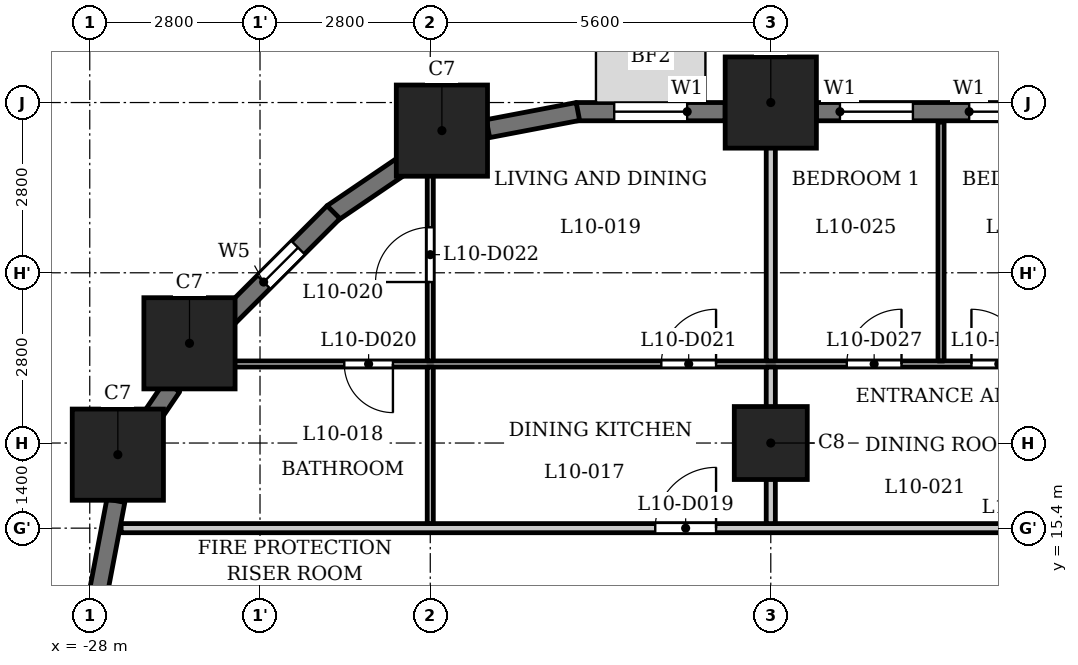
"""IFC4 building model, lengths in metres.
Left out: names, types, materials, properties, quantities, classifications, styles, units other than length and angle.
Written with IfcOpenShell. Run it as: python <this file> out.ifc"""

import sys

from ifc_helpers import new_model, si_unit, direction, frame, frame_2d, origin, origin_2d, place, context, subcontext, project, spatial, rectangle, extrude, element, fill, save


model = new_model("IFC4")
c1 = context("Model", 3, precision=1e-05, world=origin(), true_north=direction((0.0, 1.0)))
c2 = subcontext(c1, "Body", "Model", "MODEL_VIEW")
j1 = project(units=[si_unit("LENGTHUNIT", "METRE"), si_unit("PLANEANGLEUNIT", "RADIAN")], contexts=[c1])
p1 = place(None, origin())
s1 = spatial("IfcSite", under=j1, at=p1, CompositionType="ELEMENT")
p2 = place(p1, origin())
s2 = spatial("IfcBuilding", under=s1, at=p2, CompositionType="ELEMENT")
p3 = place(p2, frame((0.0, 0.0, 44.5)))
s3 = spatial("IfcBuildingStorey", under=s2, at=p3, CompositionType="ELEMENT", Elevation=44.5)
for number, where, z_axis, x_axis in (
    (1, (-16.8, 22.4, 0.0), (0.0, 0.0, 1.0), (1.0, 0.0, 0.0)),
    (2, (-22.209, 21.938, 0.0), (0.0, 0.0, 1.0), (1.0, 0.0, 0.0)),
    (3, (-26.36, 18.44, 0.0), (0.0, 0.0, 1.0), (1.0, 0.0, 0.0)),
    (4, (-27.538, 16.609, 0.0), (0.0, 0.0, 1.0), (1.0, 0.0, 0.0)),
):
    element("IfcColumn", number, at=place(p3, frame(where, z_axis=z_axis, x_axis=x_axis)), inside=s3, PredefinedType="COLUMN", context=c2, shape_type="SweptSolid", body=[
        extrude(rectangle(XDim=1.5, YDim=1.5, at=origin_2d()), origin(), (0.0, 0.0, 1.0), 3.5),
    ])
p4 = place(p3, frame((-16.8, 16.8, 0.0), z_axis=(0.0, 0.0, 1.0), x_axis=(1.0, 0.0, 0.0)))
e5 = element("IfcColumn", 5, at=p4, inside=s3, PredefinedType="COLUMN", context=c2, shape_type="SweptSolid", body=[
    extrude(rectangle(XDim=1.2, YDim=1.2, at=origin_2d()), origin(), (0.0, 0.0, 1.0), 3.5),
])
p5 = place(p3, frame((-11.95, 22.25, 0.0), z_axis=(0.0, 0.0, 1.0), x_axis=(-1.0, 0.0, 0.0)))
e6 = element("IfcWall", 6, at=p5, inside=s3, PredefinedType="SOLIDWALL", context=c2, shape_type="SweptSolid", body=[
    extrude(rectangle(XDim=4.1, YDim=0.3, at=frame_2d((2.05, 0.0))), origin(), (0.0, 0.0, 1.0), 2.35),
])
p6 = place(p5, frame((0.387, 0.0, 0.6)))
e7 = element("IfcOpeningElement", 7, at=p6, cuts=e6, PredefinedType="OPENING", context=c2, shape_type="SweptSolid", body=[
    extrude(rectangle(XDim=1.2, YDim=1.55, at=frame_2d((0.6, 0.775))), frame((0.0, 0.16, 0.0), z_axis=(0.0, -1.0, 0.0), x_axis=(1.0, 0.0, 0.0)), (0.0, 0.0, 1.0), 0.32),
])
p7 = place(p5, frame((2.512, 0.0, 0.6)))
e8 = element("IfcOpeningElement", 8, at=p7, cuts=e6, PredefinedType="OPENING", context=c2, shape_type="SweptSolid", body=[
    extrude(rectangle(XDim=1.2, YDim=1.55, at=frame_2d((0.6, 0.775))), frame((0.0, 0.16, 0.0), z_axis=(0.0, -1.0, 0.0), x_axis=(1.0, 0.0, 0.0)), (0.0, 0.0, 1.0), 0.32),
])
p8 = place(p3, frame((-17.55, 22.25, 0.0), z_axis=(0.0, 0.0, 1.0), x_axis=(-1.0, 0.0, 0.0)))
e9 = element("IfcWall", 9, at=p8, inside=s3, PredefinedType="SOLIDWALL", context=c2, shape_type="SweptSolid", body=[
    extrude(rectangle(XDim=2.45, YDim=0.3, at=frame_2d((1.225, 0.0))), origin(), (0.0, 0.0, 1.0), 2.35),
])
p9 = place(p8, frame((0.625, 0.0, 0.6)))
e10 = element("IfcOpeningElement", 10, at=p9, cuts=e9, PredefinedType="OPENING", context=c2, shape_type="SweptSolid", body=[
    extrude(rectangle(XDim=1.2, YDim=1.55, at=frame_2d((0.6, 0.775))), frame((0.0, 0.16, 0.0), z_axis=(0.0, -1.0, 0.0), x_axis=(1.0, 0.0, 0.0)), (0.0, 0.0, 1.0), 0.32),
])
for number, where, z_axis, x_axis in (
    (11, (-19.972, 22.253, 0.0), (0.0, 0.0, 1.0), (-0.982, -0.187, 0.0)),
    (12, (-22.767, 21.426, 0.0), (0.0, 0.0, 1.0), (-0.827, -0.562, 0.0)),
):
    element("IfcWall", number, at=place(p3, frame(where, z_axis=z_axis, x_axis=x_axis)), inside=s3, PredefinedType="SOLIDWALL", context=c2, shape_type="SweptSolid", body=[
        extrude(rectangle(XDim=1.506, YDim=0.3, at=frame_2d((0.753, 0.0))), origin(), (0.0, 0.0, 1.0), 2.35),
    ])
p10 = place(p3, frame((-23.991, 20.597, 0.0), z_axis=(0.0, 0.0, 1.0), x_axis=(-0.707106781187, -0.707106781187, 0.0)))
e13 = element("IfcWall", 13, at=p10, inside=s3, PredefinedType="SOLIDWALL", context=c2, shape_type="SweptSolid", body=[
    extrude(rectangle(XDim=2.45, YDim=0.3, at=frame_2d((1.225, 0.0))), origin(), (0.0, 0.0, 1.0), 2.35),
])
p11 = place(p10, frame((0.825, 0.0, 0.6)))
e14 = element("IfcOpeningElement", 14, at=p11, cuts=e13, PredefinedType="OPENING", context=c2, shape_type="SweptSolid", body=[
    extrude(rectangle(XDim=0.8, YDim=1.55, at=frame_2d((0.4, 0.775))), frame((0.0, 0.16, 0.0), z_axis=(0.0, -1.0, 0.0), x_axis=(1.0, 0.0, 0.0)), (0.0, 0.0, 1.0), 0.32),
])
p12 = place(p3, frame((-26.645, 17.727, 0.0), z_axis=(0.0, 0.0, 1.0), x_axis=(-0.562083182981, -0.827080706709, 0.0)))
e15 = element("IfcWall", 15, at=p12, inside=s3, PredefinedType="SOLIDWALL", context=c2, shape_type="SweptSolid", body=[
    extrude(rectangle(XDim=0.677, YDim=0.3, at=frame_2d((0.339, 0.0))), origin(), (0.0, 0.0, 1.0), 3.2),
])
p13 = place(p3, frame((-27.571, 15.851, 0.0), z_axis=(0.0, 0.0, 1.0), x_axis=(-0.187223837635, -0.982317277982, 0.0)))
e16 = element("IfcWall", 16, at=p13, inside=s3, PredefinedType="SOLIDWALL", context=c2, shape_type="SweptSolid", body=[
    extrude(rectangle(XDim=1.506, YDim=0.3, at=frame_2d((0.753, 0.0))), origin(), (0.0, 0.0, 1.0), 2.35),
])
p14 = place(p3, frame((-27.484, 15.4, 0.0), z_axis=(0.0, 0.0, 1.0), x_axis=(1.0, 0.0, 0.0)))
e17 = element("IfcWall", 17, at=p14, inside=s3, PredefinedType="PARTITIONING", context=c2, shape_type="SweptSolid", body=[
    extrude(rectangle(XDim=54.968, YDim=0.15, at=frame_2d((27.484, 0.0))), origin(), (0.0, 0.0, 1.0), 3.2),
])
p15 = place(p14, frame((8.784, 0.0, 0.0)))
e18 = element("IfcOpeningElement", 18, at=p15, cuts=e17, PredefinedType="OPENING", context=c2, shape_type="SweptSolid", body=[
    extrude(rectangle(XDim=1.0, YDim=2.1, at=frame_2d((0.5, 1.05))), frame((0.0, 0.085, 0.0), z_axis=(0.0, -1.0, 0.0), x_axis=(1.0, 0.0, 0.0)), (0.0, 0.0, 1.0), 0.17),
])
p16 = place(p14, frame((14.634, 0.0, 0.0)))
e19 = element("IfcOpeningElement", 19, at=p16, cuts=e17, PredefinedType="OPENING", context=c2, shape_type="SweptSolid", body=[
    extrude(rectangle(XDim=1.0, YDim=2.1, at=frame_2d((0.5, 1.05))), frame((0.0, 0.085, 0.0), z_axis=(0.0, -1.0, 0.0), x_axis=(1.0, 0.0, 0.0)), (0.0, 0.0, 1.0), 0.17),
])
p17 = place(p14, frame((25.834, 0.0, 0.0)))
e20 = element("IfcOpeningElement", 20, at=p17, cuts=e17, PredefinedType="OPENING", context=c2, shape_type="SweptSolid", body=[
    extrude(rectangle(XDim=1.0, YDim=2.1, at=frame_2d((0.5, 1.05))), frame((0.0, 0.085, 0.0), z_axis=(0.0, -1.0, 0.0), x_axis=(1.0, 0.0, 0.0)), (0.0, 0.0, 1.0), 0.17),
])
p18 = place(p14, frame((30.184, 0.0, 0.0)))
e21 = element("IfcOpeningElement", 21, at=p18, cuts=e17, PredefinedType="OPENING", context=c2, shape_type="SweptSolid", body=[
    extrude(rectangle(XDim=1.0, YDim=2.1, at=frame_2d((0.5, 1.05))), frame((0.0, 0.085, 0.0), z_axis=(0.0, -1.0, 0.0), x_axis=(1.0, 0.0, 0.0)), (0.0, 0.0, 1.0), 0.17),
])
p19 = place(p14, frame((37.034, 0.0, 0.0)))
e22 = element("IfcOpeningElement", 22, at=p19, cuts=e17, PredefinedType="OPENING", context=c2, shape_type="SweptSolid", body=[
    extrude(rectangle(XDim=1.0, YDim=2.1, at=frame_2d((0.5, 1.05))), frame((0.0, 0.085, 0.0), z_axis=(0.0, -1.0, 0.0), x_axis=(1.0, 0.0, 0.0)), (0.0, 0.0, 1.0), 0.17),
])
p20 = place(p14, frame((48.234, 0.0, 0.0)))
e23 = element("IfcOpeningElement", 23, at=p20, cuts=e17, PredefinedType="OPENING", context=c2, shape_type="SweptSolid", body=[
    extrude(rectangle(XDim=1.0, YDim=2.1, at=frame_2d((0.5, 1.05))), frame((0.0, 0.085, 0.0), z_axis=(0.0, -1.0, 0.0), x_axis=(1.0, 0.0, 0.0)), (0.0, 0.0, 1.0), 0.17),
])
p21 = place(p3, frame((-26.44, 18.1, 0.0), z_axis=(0.0, 0.0, 1.0), x_axis=(1.0, 0.0, 0.0)))
e24 = element("IfcWall", 24, at=p21, inside=s3, PredefinedType="PARTITIONING", context=c2, shape_type="SweptSolid", body=[
    extrude(rectangle(XDim=52.63, YDim=0.1, at=frame_2d((26.315, 0.0))), origin(), (0.0, 0.0, 1.0), 3.2),
])
p22 = place(p21, frame((2.626, 0.0, 0.0)))
e25 = element("IfcOpeningElement", 25, at=p22, cuts=e24, PredefinedType="OPENING", context=c2, shape_type="SweptSolid", body=[
    extrude(rectangle(XDim=0.8, YDim=2.1, at=frame_2d((0.4, 1.05))), frame((0.0, 0.06, 0.0), z_axis=(0.0, -1.0, 0.0), x_axis=(1.0, 0.0, 0.0)), (0.0, 0.0, 1.0), 0.12),
])
p23 = place(p21, frame((7.84, 0.0, 0.0)))
e26 = element("IfcOpeningElement", 26, at=p23, cuts=e24, PredefinedType="OPENING", context=c2, shape_type="SweptSolid", body=[
    extrude(rectangle(XDim=0.9, YDim=2.1, at=frame_2d((0.45, 1.05))), frame((0.0, 0.06, 0.0), z_axis=(0.0, -1.0, 0.0), x_axis=(1.0, 0.0, 0.0)), (0.0, 0.0, 1.0), 0.12),
])
p24 = place(p21, frame((18.49, 0.0, 0.0)))
e27 = element("IfcOpeningElement", 27, at=p24, cuts=e24, PredefinedType="OPENING", context=c2, shape_type="SweptSolid", body=[
    extrude(rectangle(XDim=0.8, YDim=2.1, at=frame_2d((0.4, 1.05))), frame((0.0, 0.06, 0.0), z_axis=(0.0, -1.0, 0.0), x_axis=(1.0, 0.0, 0.0)), (0.0, 0.0, 1.0), 0.12),
])
p25 = place(p21, frame((16.54, 0.0, 0.0)))
e28 = element("IfcOpeningElement", 28, at=p25, cuts=e24, PredefinedType="OPENING", context=c2, shape_type="SweptSolid", body=[
    extrude(rectangle(XDim=0.9, YDim=2.1, at=frame_2d((0.45, 1.05))), frame((0.0, 0.06, 0.0), z_axis=(0.0, -1.0, 0.0), x_axis=(1.0, 0.0, 0.0)), (0.0, 0.0, 1.0), 0.12),
])
p26 = place(p21, frame((10.89, 0.0, 0.0)))
e29 = element("IfcOpeningElement", 29, at=p26, cuts=e24, PredefinedType="OPENING", context=c2, shape_type="SweptSolid", body=[
    extrude(rectangle(XDim=0.9, YDim=2.1, at=frame_2d((0.45, 1.05))), frame((0.0, 0.06, 0.0), z_axis=(0.0, -1.0, 0.0), x_axis=(1.0, 0.0, 0.0)), (0.0, 0.0, 1.0), 0.12),
])
p27 = place(p21, frame((12.94, 0.0, 0.0)))
e30 = element("IfcOpeningElement", 30, at=p27, cuts=e24, PredefinedType="OPENING", context=c2, shape_type="SweptSolid", body=[
    extrude(rectangle(XDim=0.9, YDim=2.1, at=frame_2d((0.45, 1.05))), frame((0.0, 0.06, 0.0), z_axis=(0.0, -1.0, 0.0), x_axis=(1.0, 0.0, 0.0)), (0.0, 0.0, 1.0), 0.12),
])
p28 = place(p21, frame((21.49, 0.0, 0.0)))
e31 = element("IfcOpeningElement", 31, at=p28, cuts=e24, PredefinedType="OPENING", context=c2, shape_type="SweptSolid", body=[
    extrude(rectangle(XDim=0.8, YDim=2.1, at=frame_2d((0.4, 1.05))), frame((0.0, 0.06, 0.0), z_axis=(0.0, -1.0, 0.0), x_axis=(1.0, 0.0, 0.0)), (0.0, 0.0, 1.0), 0.12),
])
p29 = place(p21, frame((24.89, 0.0, 0.0)))
e32 = element("IfcOpeningElement", 32, at=p29, cuts=e24, PredefinedType="OPENING", context=c2, shape_type="SweptSolid", body=[
    extrude(rectangle(XDim=0.9, YDim=2.1, at=frame_2d((0.45, 1.05))), frame((0.0, 0.06, 0.0), z_axis=(0.0, -1.0, 0.0), x_axis=(1.0, 0.0, 0.0)), (0.0, 0.0, 1.0), 0.12),
])
p30 = place(p21, frame((27.09, 0.0, 0.0)))
e33 = element("IfcOpeningElement", 33, at=p30, cuts=e24, PredefinedType="OPENING", context=c2, shape_type="SweptSolid", body=[
    extrude(rectangle(XDim=0.8, YDim=2.1, at=frame_2d((0.4, 1.05))), frame((0.0, 0.06, 0.0), z_axis=(0.0, -1.0, 0.0), x_axis=(1.0, 0.0, 0.0)), (0.0, 0.0, 1.0), 0.12),
])
p31 = place(p21, frame((28.99, 0.0, 0.0)))
e34 = element("IfcOpeningElement", 34, at=p31, cuts=e24, PredefinedType="OPENING", context=c2, shape_type="SweptSolid", body=[
    extrude(rectangle(XDim=0.9, YDim=2.1, at=frame_2d((0.45, 1.05))), frame((0.0, 0.06, 0.0), z_axis=(0.0, -1.0, 0.0), x_axis=(1.0, 0.0, 0.0)), (0.0, 0.0, 1.0), 0.12),
])
p32 = place(p21, frame((41.69, 0.0, 0.0)))
e35 = element("IfcOpeningElement", 35, at=p32, cuts=e24, PredefinedType="OPENING", context=c2, shape_type="SweptSolid", body=[
    extrude(rectangle(XDim=0.8, YDim=2.1, at=frame_2d((0.4, 1.05))), frame((0.0, 0.06, 0.0), z_axis=(0.0, -1.0, 0.0), x_axis=(1.0, 0.0, 0.0)), (0.0, 0.0, 1.0), 0.12),
])
p33 = place(p21, frame((38.99, 0.0, 0.0)))
e36 = element("IfcOpeningElement", 36, at=p33, cuts=e24, PredefinedType="OPENING", context=c2, shape_type="SweptSolid", body=[
    extrude(rectangle(XDim=0.9, YDim=2.1, at=frame_2d((0.45, 1.05))), frame((0.0, 0.06, 0.0), z_axis=(0.0, -1.0, 0.0), x_axis=(1.0, 0.0, 0.0)), (0.0, 0.0, 1.0), 0.12),
])
p34 = place(p21, frame((33.29, 0.0, 0.0)))
e37 = element("IfcOpeningElement", 37, at=p34, cuts=e24, PredefinedType="OPENING", context=c2, shape_type="SweptSolid", body=[
    extrude(rectangle(XDim=0.9, YDim=2.1, at=frame_2d((0.45, 1.05))), frame((0.0, 0.06, 0.0), z_axis=(0.0, -1.0, 0.0), x_axis=(1.0, 0.0, 0.0)), (0.0, 0.0, 1.0), 0.12),
])
p35 = place(p21, frame((35.34, 0.0, 0.0)))
e38 = element("IfcOpeningElement", 38, at=p35, cuts=e24, PredefinedType="OPENING", context=c2, shape_type="SweptSolid", body=[
    extrude(rectangle(XDim=0.9, YDim=2.1, at=frame_2d((0.45, 1.05))), frame((0.0, 0.06, 0.0), z_axis=(0.0, -1.0, 0.0), x_axis=(1.0, 0.0, 0.0)), (0.0, 0.0, 1.0), 0.12),
])
p36 = place(p21, frame((50.74, 0.0, 0.0)))
e39 = element("IfcOpeningElement", 39, at=p36, cuts=e24, PredefinedType="OPENING", context=c2, shape_type="SweptSolid", body=[
    extrude(rectangle(XDim=0.8, YDim=2.1, at=frame_2d((0.4, 1.05))), frame((0.0, 0.06, 0.0), z_axis=(0.0, -1.0, 0.0), x_axis=(1.0, 0.0, 0.0)), (0.0, 0.0, 1.0), 0.12),
])
p37 = place(p21, frame((47.29, 0.0, 0.0)))
e40 = element("IfcOpeningElement", 40, at=p37, cuts=e24, PredefinedType="OPENING", context=c2, shape_type="SweptSolid", body=[
    extrude(rectangle(XDim=0.9, YDim=2.1, at=frame_2d((0.45, 1.05))), frame((0.0, 0.06, 0.0), z_axis=(0.0, -1.0, 0.0), x_axis=(1.0, 0.0, 0.0)), (0.0, 0.0, 1.0), 0.12),
])
p38 = place(p3, frame((-22.4, 15.475, 0.0), z_axis=(0.0, 0.0, 1.0), x_axis=(0.0, 1.0, 0.0)))
e41 = element("IfcWall", 41, at=p38, inside=s3, PredefinedType="PARTITIONING", context=c2, shape_type="SweptSolid", body=[
    extrude(rectangle(XDim=2.575, YDim=0.1, at=frame_2d((1.288, 0.0))), origin(), (0.0, 0.0, 1.0), 3.2),
])
p39 = place(p3, frame((-22.4, 18.15, 0.0), z_axis=(0.0, 0.0, 1.0), x_axis=(0.0, 1.0, 0.0)))
e42 = element("IfcWall", 42, at=p39, inside=s3, PredefinedType="PARTITIONING", context=c2, shape_type="SweptSolid", body=[
    extrude(rectangle(XDim=3.57, YDim=0.1, at=frame_2d((1.785, 0.0))), origin(), (0.0, 0.0, 1.0), 3.2),
])
p40 = place(p39, frame((1.298, 0.0, 0.0)))
e43 = element("IfcOpeningElement", 43, at=p40, cuts=e42, PredefinedType="OPENING", context=c2, shape_type="SweptSolid", body=[
    extrude(rectangle(XDim=0.9, YDim=2.1, at=frame_2d((0.45, 1.05))), frame((0.0, 0.06, 0.0), z_axis=(0.0, -1.0, 0.0), x_axis=(1.0, 0.0, 0.0)), (0.0, 0.0, 1.0), 0.12),
])
p41 = place(p3, frame((-16.8, 15.475, 0.0), z_axis=(0.0, 0.0, 1.0), x_axis=(0.0, 1.0, 0.0)))
e44 = element("IfcWall", 44, at=p41, inside=s3, PredefinedType="PARTITIONING", context=c2, shape_type="SweptSolid", body=[
    extrude(rectangle(XDim=2.575, YDim=0.15, at=frame_2d((1.288, 0.0))), origin(), (0.0, 0.0, 1.0), 3.2),
])
p42 = place(p3, frame((-16.8, 18.15, 0.0), z_axis=(0.0, 0.0, 1.0), x_axis=(0.0, 1.0, 0.0)))
e45 = element("IfcWall", 45, at=p42, inside=s3, PredefinedType="PARTITIONING", context=c2, shape_type="SweptSolid", body=[
    extrude(rectangle(XDim=4.98, YDim=0.15, at=frame_2d((2.49, 0.0))), origin(), (0.0, 0.0, 1.0), 3.2),
])
p43 = place(p3, frame((-14.0, 18.15, 0.0), z_axis=(0.0, 0.0, 1.0), x_axis=(0.0, 1.0, 0.0)))
e46 = element("IfcWall", 46, at=p43, inside=s3, PredefinedType="PARTITIONING", context=c2, shape_type="SweptSolid", body=[
    extrude(rectangle(XDim=3.93, YDim=0.1, at=frame_2d((1.965, 0.0))), origin(), (0.0, 0.0, 1.0), 3.2),
])
p44 = place(p15, origin())
e47 = element("IfcDoor", 47, at=p44, inside=s3, OperationType="SINGLE_SWING_LEFT", PredefinedType="DOOR", context=c2, shape_type="SweptSolid", body=[
    extrude(rectangle(XDim=1.0, YDim=2.1, at=frame_2d((0.5, 1.05))), frame((0.0, 0.025, 0.0), z_axis=(0.0, -1.0, 0.0), x_axis=(1.0, 0.0, 0.0)), (0.0, 0.0, 1.0), 0.05),
])
fill(e18, e47)
p45 = place(p22, origin())
e48 = element("IfcDoor", 48, at=p45, inside=s3, OperationType="SINGLE_SWING_RIGHT", PredefinedType="DOOR", context=c2, shape_type="SweptSolid", body=[
    extrude(rectangle(XDim=0.8, YDim=2.1, at=frame_2d((0.4, 1.05))), frame((0.0, 0.025, 0.0), z_axis=(0.0, -1.0, 0.0), x_axis=(1.0, 0.0, 0.0)), (0.0, 0.0, 1.0), 0.05),
])
fill(e25, e48)
p46 = place(p23, origin())
e49 = element("IfcDoor", 49, at=p46, inside=s3, OperationType="SINGLE_SWING_LEFT", PredefinedType="DOOR", context=c2, shape_type="SweptSolid", body=[
    extrude(rectangle(XDim=0.9, YDim=2.1, at=frame_2d((0.45, 1.05))), frame((0.0, 0.025, 0.0), z_axis=(0.0, -1.0, 0.0), x_axis=(1.0, 0.0, 0.0)), (0.0, 0.0, 1.0), 0.05),
])
fill(e26, e49)
p47 = place(p40, origin())
e50 = element("IfcDoor", 50, at=p47, inside=s3, OperationType="SINGLE_SWING_RIGHT", PredefinedType="DOOR", context=c2, shape_type="SweptSolid", body=[
    extrude(rectangle(XDim=0.9, YDim=2.1, at=frame_2d((0.45, 1.05))), frame((0.0, 0.025, 0.0), z_axis=(0.0, -1.0, 0.0), x_axis=(1.0, 0.0, 0.0)), (0.0, 0.0, 1.0), 0.05),
])
fill(e43, e50)
p48 = place(p26, origin())
e51 = element("IfcDoor", 51, at=p48, inside=s3, OperationType="SINGLE_SWING_LEFT", PredefinedType="DOOR", context=c2, shape_type="SweptSolid", body=[
    extrude(rectangle(XDim=0.9, YDim=2.1, at=frame_2d((0.45, 1.05))), frame((0.0, 0.025, 0.0), z_axis=(0.0, -1.0, 0.0), x_axis=(1.0, 0.0, 0.0)), (0.0, 0.0, 1.0), 0.05),
])
fill(e29, e51)
p49 = place(p27, origin())
e52 = element("IfcDoor", 52, at=p49, inside=s3, OperationType="SINGLE_SWING_RIGHT", PredefinedType="DOOR", context=c2, shape_type="SweptSolid", body=[
    extrude(rectangle(XDim=0.9, YDim=2.1, at=frame_2d((0.45, 1.05))), frame((0.0, 0.025, 0.0), z_axis=(0.0, -1.0, 0.0), x_axis=(1.0, 0.0, 0.0)), (0.0, 0.0, 1.0), 0.05),
])
fill(e30, e52)
p50 = place(p6, origin())
e53 = element("IfcWindow", 53, at=p50, inside=s3, PartitioningType="SINGLE_PANEL", PredefinedType="WINDOW", context=c2, shape_type="SweptSolid", body=[
    extrude(rectangle(XDim=1.2, YDim=1.55, at=frame_2d((0.6, 0.775))), frame((0.0, 0.03, 0.0), z_axis=(0.0, -1.0, 0.0), x_axis=(1.0, 0.0, 0.0)), (0.0, 0.0, 1.0), 0.06),
])
fill(e7, e53)
p51 = place(p7, origin())
e54 = element("IfcWindow", 54, at=p51, inside=s3, PartitioningType="SINGLE_PANEL", PredefinedType="WINDOW", context=c2, shape_type="SweptSolid", body=[
    extrude(rectangle(XDim=1.2, YDim=1.55, at=frame_2d((0.6, 0.775))), frame((0.0, 0.03, 0.0), z_axis=(0.0, -1.0, 0.0), x_axis=(1.0, 0.0, 0.0)), (0.0, 0.0, 1.0), 0.06),
])
fill(e8, e54)
p52 = place(p9, origin())
e55 = element("IfcWindow", 55, at=p52, inside=s3, PartitioningType="SINGLE_PANEL", PredefinedType="WINDOW", context=c2, shape_type="SweptSolid", body=[
    extrude(rectangle(XDim=1.2, YDim=1.55, at=frame_2d((0.6, 0.775))), frame((0.0, 0.03, 0.0), z_axis=(0.0, -1.0, 0.0), x_axis=(1.0, 0.0, 0.0)), (0.0, 0.0, 1.0), 0.06),
])
fill(e10, e55)
p53 = place(p11, origin())
e56 = element("IfcWindow", 56, at=p53, inside=s3, PartitioningType="SINGLE_PANEL", PredefinedType="WINDOW", context=c2, shape_type="SweptSolid", body=[
    extrude(rectangle(XDim=0.8, YDim=1.55, at=frame_2d((0.4, 0.775))), frame((0.0, 0.03, 0.0), z_axis=(0.0, -1.0, 0.0), x_axis=(1.0, 0.0, 0.0)), (0.0, 0.0, 1.0), 0.06),
])
fill(e14, e56)
save(model, sys.argv[1])
